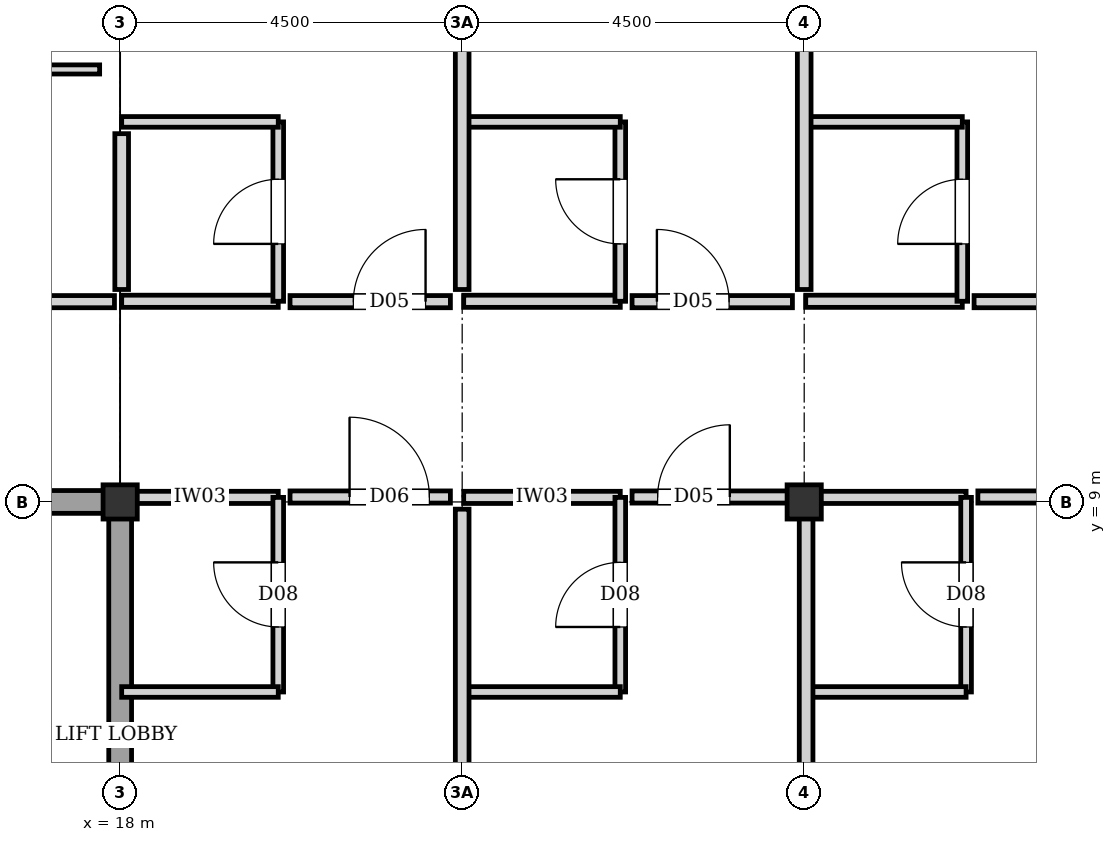
"""IFC4 building model, lengths in metres.
Left out: names, types, materials, properties, quantities, classifications, styles, units other than length and angle.
Written with IfcOpenShell. Run it as: python <this file> out.ifc"""

import sys

from ifc_helpers import new_model, si_unit, direction, frame, frame_2d, origin, origin_2d, place, context, subcontext, project, spatial, rectangle, extrude, element, fill, save


model = new_model("IFC4")
c1 = context("Model", 3, precision=1e-05, world=origin(), true_north=direction((0.0, 1.0)))
c2 = subcontext(c1, "Body", "Model", "MODEL_VIEW")
j1 = project(units=[si_unit("LENGTHUNIT", "METRE"), si_unit("PLANEANGLEUNIT", "RADIAN")], contexts=[c1])
p1 = place(None, origin())
s1 = spatial("IfcSite", under=j1, at=p1, CompositionType="ELEMENT")
p2 = place(p1, origin())
s2 = spatial("IfcBuilding", under=s1, at=p2, CompositionType="ELEMENT")
p3 = place(p2, frame((0.0, 0.0, 17.6)))
s3 = spatial("IfcBuildingStorey", under=s2, at=p3, CompositionType="ELEMENT", Elevation=17.6)
for number, where, z_axis, x_axis in (
    (1, (18.0, 9.0, 0.0), (0.0, 0.0, 1.0), (1.0, 0.0, 0.0)),
    (2, (27.0, 9.0, 0.0), (0.0, 0.0, 1.0), (1.0, 0.0, 0.0)),
):
    element("IfcColumn", number, at=place(p3, frame(where, z_axis=z_axis, x_axis=x_axis)), inside=s3, PredefinedType="COLUMN", context=c2, shape_type="SweptSolid", body=[
        extrude(rectangle(XDim=0.45, YDim=0.45, at=origin_2d()), origin(), (0.0, 0.0, 1.0), 3.04),
    ])
p4 = place(p3, frame((18.0, 0.0, 0.0), z_axis=(0.0, 0.0, 1.0), x_axis=(0.0, 1.0, 0.0)))
e3 = element("IfcWall", 3, at=p4, inside=s3, PredefinedType="SHEAR", context=c2, shape_type="SweptSolid", body=[
    extrude(rectangle(XDim=9.0, YDim=0.3, at=frame_2d((4.5, 0.0))), origin(), (0.0, 0.0, 1.0), 2.82),
])
p5 = place(p3, frame((9.0, 9.0, 0.0), z_axis=(0.0, 0.0, 1.0), x_axis=(1.0, 0.0, 0.0)))
e4 = element("IfcWall", 4, at=p5, inside=s3, PredefinedType="SHEAR", context=c2, shape_type="SweptSolid", body=[
    extrude(rectangle(XDim=9.0, YDim=0.3, at=frame_2d((4.5, 0.0))), origin(), (0.0, 0.0, 1.0), 2.82),
])
p6 = place(p5, frame((5.95, 0.0, 0.0)))
e5 = element("IfcOpeningElement", 5, at=p6, cuts=e4, PredefinedType="OPENING", context=c2, shape_type="SweptSolid", body=[
    extrude(rectangle(XDim=1.6, YDim=2.1, at=frame_2d((0.8, 1.05))), frame((0.0, 0.16, 0.0), z_axis=(0.0, -1.0, 0.0), x_axis=(1.0, 0.0, 0.0)), (0.0, 0.0, 1.0), 0.32),
])
p7 = place(p3, frame((18.02, 9.06, 0.0), z_axis=(0.0, 0.0, 1.0), x_axis=(1.0, 0.0, 0.0)))
e6 = element("IfcWall", 6, at=p7, inside=s3, PredefinedType="PARTITIONING", context=c2, shape_type="SweptSolid", body=[
    extrude(rectangle(XDim=2.06, YDim=0.16, at=frame_2d((1.03, 0.0))), origin(), (0.0, 0.0, 1.0), 2.34),
])
p8 = place(p3, frame((20.08, 6.5, 0.0), z_axis=(0.0, 0.0, 1.0), x_axis=(0.0, 1.0, 0.0)))
e7 = element("IfcWall", 7, at=p8, inside=s3, PredefinedType="PLUMBINGWALL", context=c2, shape_type="SweptSolid", body=[
    extrude(rectangle(XDim=2.56, YDim=0.14, at=frame_2d((1.28, 0.0))), origin(), (0.0, 0.0, 1.0), 2.82),
])
p9 = place(p8, frame((0.855, 0.0, 0.0)))
e8 = element("IfcOpeningElement", 8, at=p9, cuts=e7, PredefinedType="OPENING", context=c2, shape_type="SweptSolid", body=[
    extrude(rectangle(XDim=0.85, YDim=2.04, at=frame_2d((0.425, 1.02))), frame((0.0, 0.08, 0.0), z_axis=(0.0, -1.0, 0.0), x_axis=(1.0, 0.0, 0.0)), (0.0, 0.0, 1.0), 0.16),
])
p10 = place(p3, frame((18.02, 6.5, 0.0), z_axis=(0.0, 0.0, 1.0), x_axis=(1.0, 0.0, 0.0)))
e9 = element("IfcWall", 9, at=p10, inside=s3, PredefinedType="PLUMBINGWALL", context=c2, shape_type="SweptSolid", body=[
    extrude(rectangle(XDim=2.06, YDim=0.14, at=frame_2d((1.03, 0.0))), origin(), (0.0, 0.0, 1.0), 2.82),
])
p11 = place(p3, frame((22.52, 9.06, 0.0), z_axis=(0.0, 0.0, 1.0), x_axis=(1.0, 0.0, 0.0)))
e10 = element("IfcWall", 10, at=p11, inside=s3, PredefinedType="PARTITIONING", context=c2, shape_type="SweptSolid", body=[
    extrude(rectangle(XDim=2.06, YDim=0.16, at=frame_2d((1.03, 0.0))), origin(), (0.0, 0.0, 1.0), 2.34),
])
p12 = place(p3, frame((24.58, 6.5, 0.0), z_axis=(0.0, 0.0, 1.0), x_axis=(0.0, 1.0, 0.0)))
e11 = element("IfcWall", 11, at=p12, inside=s3, PredefinedType="PLUMBINGWALL", context=c2, shape_type="SweptSolid", body=[
    extrude(rectangle(XDim=2.56, YDim=0.14, at=frame_2d((1.28, 0.0))), origin(), (0.0, 0.0, 1.0), 2.82),
])
p13 = place(p12, frame((0.855, 0.0, 0.0)))
e12 = element("IfcOpeningElement", 12, at=p13, cuts=e11, PredefinedType="OPENING", context=c2, shape_type="SweptSolid", body=[
    extrude(rectangle(XDim=0.85, YDim=2.04, at=frame_2d((0.425, 1.02))), frame((0.0, 0.08, 0.0), z_axis=(0.0, -1.0, 0.0), x_axis=(1.0, 0.0, 0.0)), (0.0, 0.0, 1.0), 0.16),
])
p14 = place(p3, frame((22.52, 6.5, 0.0), z_axis=(0.0, 0.0, 1.0), x_axis=(1.0, 0.0, 0.0)))
e13 = element("IfcWall", 13, at=p14, inside=s3, PredefinedType="PLUMBINGWALL", context=c2, shape_type="SweptSolid", body=[
    extrude(rectangle(XDim=2.06, YDim=0.14, at=frame_2d((1.03, 0.0))), origin(), (0.0, 0.0, 1.0), 2.82),
])
p15 = place(p3, frame((27.07, 9.06, 0.0), z_axis=(0.0, 0.0, 1.0), x_axis=(1.0, 0.0, 0.0)))
e14 = element("IfcWall", 14, at=p15, inside=s3, PredefinedType="PARTITIONING", context=c2, shape_type="SweptSolid", body=[
    extrude(rectangle(XDim=2.06, YDim=0.16, at=frame_2d((1.03, 0.0))), origin(), (0.0, 0.0, 1.0), 2.29),
])
p16 = place(p3, frame((29.13, 6.5, 0.0), z_axis=(0.0, 0.0, 1.0), x_axis=(0.0, 1.0, 0.0)))
e15 = element("IfcWall", 15, at=p16, inside=s3, PredefinedType="PLUMBINGWALL", context=c2, shape_type="SweptSolid", body=[
    extrude(rectangle(XDim=2.56, YDim=0.14, at=frame_2d((1.28, 0.0))), origin(), (0.0, 0.0, 1.0), 2.82),
])
p17 = place(p16, frame((0.855, 0.0, 0.0)))
e16 = element("IfcOpeningElement", 16, at=p17, cuts=e15, PredefinedType="OPENING", context=c2, shape_type="SweptSolid", body=[
    extrude(rectangle(XDim=0.85, YDim=2.04, at=frame_2d((0.425, 1.02))), frame((0.0, 0.08, 0.0), z_axis=(0.0, -1.0, 0.0), x_axis=(1.0, 0.0, 0.0)), (0.0, 0.0, 1.0), 0.16),
])
p18 = place(p3, frame((27.07, 6.5, 0.0), z_axis=(0.0, 0.0, 1.0), x_axis=(1.0, 0.0, 0.0)))
e17 = element("IfcWall", 17, at=p18, inside=s3, PredefinedType="PLUMBINGWALL", context=c2, shape_type="SweptSolid", body=[
    extrude(rectangle(XDim=2.06, YDim=0.14, at=frame_2d((1.03, 0.0))), origin(), (0.0, 0.0, 1.0), 2.82),
])
p19 = place(p3, frame((18.02, 11.64, 0.0), z_axis=(0.0, 0.0, 1.0), x_axis=(1.0, 0.0, 0.0)))
e18 = element("IfcWall", 18, at=p19, inside=s3, PredefinedType="PARTITIONING", context=c2, shape_type="SweptSolid", body=[
    extrude(rectangle(XDim=2.06, YDim=0.16, at=frame_2d((1.03, 0.0))), origin(), (0.0, 0.0, 1.0), 2.82),
])
p20 = place(p3, frame((20.08, 11.64, 0.0), z_axis=(0.0, 0.0, 1.0), x_axis=(0.0, 1.0, 0.0)))
e19 = element("IfcWall", 19, at=p20, inside=s3, PredefinedType="PLUMBINGWALL", context=c2, shape_type="SweptSolid", body=[
    extrude(rectangle(XDim=2.36, YDim=0.14, at=frame_2d((1.18, 0.0))), origin(), (0.0, 0.0, 1.0), 2.82),
])
p21 = place(p20, frame((0.755, 0.0, 0.0)))
e20 = element("IfcOpeningElement", 20, at=p21, cuts=e19, PredefinedType="OPENING", context=c2, shape_type="SweptSolid", body=[
    extrude(rectangle(XDim=0.85, YDim=2.04, at=frame_2d((0.425, 1.02))), frame((0.0, 0.08, 0.0), z_axis=(0.0, -1.0, 0.0), x_axis=(1.0, 0.0, 0.0)), (0.0, 0.0, 1.0), 0.16),
])
p22 = place(p3, frame((18.02, 14.0, 0.0), z_axis=(0.0, 0.0, 1.0), x_axis=(1.0, 0.0, 0.0)))
e21 = element("IfcWall", 21, at=p22, inside=s3, PredefinedType="PLUMBINGWALL", context=c2, shape_type="SweptSolid", body=[
    extrude(rectangle(XDim=2.06, YDim=0.14, at=frame_2d((1.03, 0.0))), origin(), (0.0, 0.0, 1.0), 2.82),
])
p23 = place(p3, frame((22.52, 11.64, 0.0), z_axis=(0.0, 0.0, 1.0), x_axis=(1.0, 0.0, 0.0)))
e22 = element("IfcWall", 22, at=p23, inside=s3, PredefinedType="PARTITIONING", context=c2, shape_type="SweptSolid", body=[
    extrude(rectangle(XDim=2.06, YDim=0.16, at=frame_2d((1.03, 0.0))), origin(), (0.0, 0.0, 1.0), 2.82),
])
p24 = place(p3, frame((24.58, 11.64, 0.0), z_axis=(0.0, 0.0, 1.0), x_axis=(0.0, 1.0, 0.0)))
e23 = element("IfcWall", 23, at=p24, inside=s3, PredefinedType="PLUMBINGWALL", context=c2, shape_type="SweptSolid", body=[
    extrude(rectangle(XDim=2.36, YDim=0.14, at=frame_2d((1.18, 0.0))), origin(), (0.0, 0.0, 1.0), 2.82),
])
p25 = place(p24, frame((0.755, 0.0, 0.0)))
e24 = element("IfcOpeningElement", 24, at=p25, cuts=e23, PredefinedType="OPENING", context=c2, shape_type="SweptSolid", body=[
    extrude(rectangle(XDim=0.85, YDim=2.04, at=frame_2d((0.425, 1.02))), frame((0.0, 0.08, 0.0), z_axis=(0.0, -1.0, 0.0), x_axis=(1.0, 0.0, 0.0)), (0.0, 0.0, 1.0), 0.16),
])
p26 = place(p3, frame((22.52, 14.0, 0.0), z_axis=(0.0, 0.0, 1.0), x_axis=(1.0, 0.0, 0.0)))
e25 = element("IfcWall", 25, at=p26, inside=s3, PredefinedType="PLUMBINGWALL", context=c2, shape_type="SweptSolid", body=[
    extrude(rectangle(XDim=2.06, YDim=0.14, at=frame_2d((1.03, 0.0))), origin(), (0.0, 0.0, 1.0), 2.82),
])
p27 = place(p3, frame((27.02, 11.64, 0.0), z_axis=(0.0, 0.0, 1.0), x_axis=(1.0, 0.0, 0.0)))
e26 = element("IfcWall", 26, at=p27, inside=s3, PredefinedType="PARTITIONING", context=c2, shape_type="SweptSolid", body=[
    extrude(rectangle(XDim=2.06, YDim=0.16, at=frame_2d((1.03, 0.0))), origin(), (0.0, 0.0, 1.0), 2.82),
])
p28 = place(p3, frame((29.08, 11.64, 0.0), z_axis=(0.0, 0.0, 1.0), x_axis=(0.0, 1.0, 0.0)))
e27 = element("IfcWall", 27, at=p28, inside=s3, PredefinedType="PLUMBINGWALL", context=c2, shape_type="SweptSolid", body=[
    extrude(rectangle(XDim=2.36, YDim=0.14, at=frame_2d((1.18, 0.0))), origin(), (0.0, 0.0, 1.0), 2.82),
])
p29 = place(p28, frame((0.755, 0.0, 0.0)))
e28 = element("IfcOpeningElement", 28, at=p29, cuts=e27, PredefinedType="OPENING", context=c2, shape_type="SweptSolid", body=[
    extrude(rectangle(XDim=0.85, YDim=2.04, at=frame_2d((0.425, 1.02))), frame((0.0, 0.08, 0.0), z_axis=(0.0, -1.0, 0.0), x_axis=(1.0, 0.0, 0.0)), (0.0, 0.0, 1.0), 0.16),
])
p30 = place(p3, frame((27.02, 14.0, 0.0), z_axis=(0.0, 0.0, 1.0), x_axis=(1.0, 0.0, 0.0)))
e29 = element("IfcWall", 29, at=p30, inside=s3, PredefinedType="PLUMBINGWALL", context=c2, shape_type="SweptSolid", body=[
    extrude(rectangle(XDim=2.06, YDim=0.14, at=frame_2d((1.03, 0.0))), origin(), (0.0, 0.0, 1.0), 2.82),
])
p31 = place(p3, frame((22.5, 0.195, 0.0), z_axis=(0.0, 0.0, 1.0), x_axis=(0.0, 1.0, 0.0)))
e30 = element("IfcWall", 30, at=p31, inside=s3, PredefinedType="PARTITIONING", context=c2, shape_type="SweptSolid", body=[
    extrude(rectangle(XDim=8.71, YDim=0.18, at=frame_2d((4.355, 0.0))), origin(), (0.0, 0.0, 1.0), 2.82),
])
p32 = place(p3, frame((27.025, 0.195, 0.0), z_axis=(0.0, 0.0, 1.0), x_axis=(0.0, 1.0, 0.0)))
e31 = element("IfcWall", 31, at=p32, inside=s3, PredefinedType="PARTITIONING", context=c2, shape_type="SweptSolid", body=[
    extrude(rectangle(XDim=8.71, YDim=0.18, at=frame_2d((4.355, 0.0))), origin(), (0.0, 0.0, 1.0), 2.34),
])
p33 = place(p3, frame((22.5, 11.795, 0.0), z_axis=(0.0, 0.0, 1.0), x_axis=(0.0, 1.0, 0.0)))
e32 = element("IfcWall", 32, at=p33, inside=s3, PredefinedType="PARTITIONING", context=c2, shape_type="SweptSolid", body=[
    extrude(rectangle(XDim=6.03, YDim=0.18, at=frame_2d((3.015, 0.0))), origin(), (0.0, 0.0, 1.0), 2.82),
])
p34 = place(p3, frame((27.0, 11.795, 0.0), z_axis=(0.0, 0.0, 1.0), x_axis=(0.0, 1.0, 0.0)))
e33 = element("IfcWall", 33, at=p34, inside=s3, PredefinedType="PARTITIONING", context=c2, shape_type="SweptSolid", body=[
    extrude(rectangle(XDim=6.03, YDim=0.18, at=frame_2d((3.015, 0.0))), origin(), (0.0, 0.0, 1.0), 2.29),
])
p35 = place(p3, frame((18.02, 11.795, 0.0), z_axis=(0.0, 0.0, 1.0), x_axis=(0.0, 1.0, 0.0)))
e34 = element("IfcWall", 34, at=p35, inside=s3, PredefinedType="PARTITIONING", context=c2, shape_type="SweptSolid", body=[
    extrude(rectangle(XDim=2.05, YDim=0.18, at=frame_2d((1.025, 0.0))), origin(), (0.0, 0.0, 1.0), 2.48),
])
p36 = place(p3, frame((15.09, 14.69, 0.0), z_axis=(0.0, 0.0, 1.0), x_axis=(1.0, 0.0, 0.0)))
e35 = element("IfcWall", 35, at=p36, inside=s3, PredefinedType="PARTITIONING", context=c2, shape_type="SweptSolid", body=[
    extrude(rectangle(XDim=2.64, YDim=0.12, at=frame_2d((1.32, 0.0))), origin(), (0.0, 0.0, 1.0), 2.82),
])
p37 = place(p3, frame((20.235, 9.065, 0.0), z_axis=(0.0, 0.0, 1.0), x_axis=(1.0, 0.0, 0.0)))
e36 = element("IfcWall", 36, at=p37, inside=s3, PredefinedType="PARTITIONING", context=c2, shape_type="SweptSolid", body=[
    extrude(rectangle(XDim=2.11, YDim=0.16, at=frame_2d((1.055, 0.0))), origin(), (0.0, 0.0, 1.0), 2.34),
])
p38 = place(p37, frame((0.783, 0.0, 0.0)))
e37 = element("IfcOpeningElement", 37, at=p38, cuts=e36, PredefinedType="OPENING", context=c2, shape_type="SweptSolid", body=[
    extrude(rectangle(XDim=1.05, YDim=2.15, at=frame_2d((0.525, 1.075))), frame((0.0, 0.09, 0.0), z_axis=(0.0, -1.0, 0.0), x_axis=(1.0, 0.0, 0.0)), (0.0, 0.0, 1.0), 0.18),
])
p39 = place(p3, frame((24.735, 9.065, 0.0), z_axis=(0.0, 0.0, 1.0), x_axis=(1.0, 0.0, 0.0)))
e38 = element("IfcWall", 38, at=p39, inside=s3, PredefinedType="PARTITIONING", context=c2, shape_type="SweptSolid", body=[
    extrude(rectangle(XDim=2.135, YDim=0.16, at=frame_2d((1.067, 0.0))), origin(), (0.0, 0.0, 1.0), 2.34),
])
p40 = place(p39, frame((0.336, 0.0, 0.0)))
e39 = element("IfcOpeningElement", 39, at=p40, cuts=e38, PredefinedType="OPENING", context=c2, shape_type="SweptSolid", body=[
    extrude(rectangle(XDim=0.95, YDim=2.15, at=frame_2d((0.475, 1.075))), frame((0.0, 0.09, 0.0), z_axis=(0.0, -1.0, 0.0), x_axis=(1.0, 0.0, 0.0)), (0.0, 0.0, 1.0), 0.18),
])
p41 = place(p3, frame((29.285, 9.065, 0.0), z_axis=(0.0, 0.0, 1.0), x_axis=(1.0, 0.0, 0.0)))
e40 = element("IfcWall", 40, at=p41, inside=s3, PredefinedType="PARTITIONING", context=c2, shape_type="SweptSolid", body=[
    extrude(rectangle(XDim=6.56, YDim=0.16, at=frame_2d((3.28, 0.0))), origin(), (0.0, 0.0, 1.0), 2.29),
])
p42 = place(p41, frame((1.75, 0.0, 0.0)))
e41 = element("IfcOpeningElement", 41, at=p42, cuts=e40, PredefinedType="OPENING", context=c2, shape_type="SweptSolid", body=[
    extrude(rectangle(XDim=1.3, YDim=2.25, at=frame_2d((0.65, 1.125))), frame((0.0, 0.09, 0.0), z_axis=(0.0, -1.0, 0.0), x_axis=(1.0, 0.0, 0.0)), (0.0, 0.0, 1.0), 0.18),
])
p43 = place(p3, frame((15.09, 11.635, 0.0), z_axis=(0.0, 0.0, 1.0), x_axis=(1.0, 0.0, 0.0)))
e42 = element("IfcWall", 42, at=p43, inside=s3, PredefinedType="PARTITIONING", context=c2, shape_type="SweptSolid", body=[
    extrude(rectangle(XDim=2.835, YDim=0.16, at=frame_2d((1.417, 0.0))), origin(), (0.0, 0.0, 1.0), 2.82),
])
p44 = place(p43, frame((0.577, 0.0, 0.0)))
e43 = element("IfcOpeningElement", 43, at=p44, cuts=e42, PredefinedType="OPENING", context=c2, shape_type="SweptSolid", body=[
    extrude(rectangle(XDim=1.0, YDim=2.1, at=frame_2d((0.5, 1.05))), frame((0.0, 0.09, 0.0), z_axis=(0.0, -1.0, 0.0), x_axis=(1.0, 0.0, 0.0)), (0.0, 0.0, 1.0), 0.18),
])
p45 = place(p3, frame((20.235, 11.635, 0.0), z_axis=(0.0, 0.0, 1.0), x_axis=(1.0, 0.0, 0.0)))
e44 = element("IfcWall", 44, at=p45, inside=s3, PredefinedType="PARTITIONING", context=c2, shape_type="SweptSolid", body=[
    extrude(rectangle(XDim=2.11, YDim=0.16, at=frame_2d((1.055, 0.0))), origin(), (0.0, 0.0, 1.0), 2.82),
])
p46 = place(p45, frame((0.833, 0.0, 0.0)))
e45 = element("IfcOpeningElement", 45, at=p46, cuts=e44, PredefinedType="OPENING", context=c2, shape_type="SweptSolid", body=[
    extrude(rectangle(XDim=0.95, YDim=2.15, at=frame_2d((0.475, 1.075))), frame((0.0, 0.09, 0.0), z_axis=(0.0, -1.0, 0.0), x_axis=(1.0, 0.0, 0.0)), (0.0, 0.0, 1.0), 0.18),
])
p47 = place(p3, frame((24.735, 11.635, 0.0), z_axis=(0.0, 0.0, 1.0), x_axis=(1.0, 0.0, 0.0)))
e46 = element("IfcWall", 46, at=p47, inside=s3, PredefinedType="PARTITIONING", context=c2, shape_type="SweptSolid", body=[
    extrude(rectangle(XDim=2.11, YDim=0.16, at=frame_2d((1.055, 0.0))), origin(), (0.0, 0.0, 1.0), 2.82),
])
p48 = place(p47, frame((0.327, 0.0, 0.0)))
e47 = element("IfcOpeningElement", 47, at=p48, cuts=e46, PredefinedType="OPENING", context=c2, shape_type="SweptSolid", body=[
    extrude(rectangle(XDim=0.95, YDim=2.15, at=frame_2d((0.475, 1.075))), frame((0.0, 0.09, 0.0), z_axis=(0.0, -1.0, 0.0), x_axis=(1.0, 0.0, 0.0)), (0.0, 0.0, 1.0), 0.18),
])
p49 = place(p3, frame((29.235, 11.635, 0.0), z_axis=(0.0, 0.0, 1.0), x_axis=(1.0, 0.0, 0.0)))
e48 = element("IfcWall", 48, at=p49, inside=s3, PredefinedType="PARTITIONING", context=c2, shape_type="SweptSolid", body=[
    extrude(rectangle(XDim=2.11, YDim=0.16, at=frame_2d((1.055, 0.0))), origin(), (0.0, 0.0, 1.0), 2.82),
])
p50 = place(p49, frame((0.833, 0.0, 0.0)))
e49 = element("IfcOpeningElement", 49, at=p50, cuts=e48, PredefinedType="OPENING", context=c2, shape_type="SweptSolid", body=[
    extrude(rectangle(XDim=0.95, YDim=2.15, at=frame_2d((0.475, 1.075))), frame((0.0, 0.09, 0.0), z_axis=(0.0, -1.0, 0.0), x_axis=(1.0, 0.0, 0.0)), (0.0, 0.0, 1.0), 0.18),
])
p51 = place(p9, origin())
e50 = element("IfcDoor", 50, at=p51, inside=s3, OperationType="SINGLE_SWING_RIGHT", PredefinedType="DOOR", context=c2, shape_type="SweptSolid", body=[
    extrude(rectangle(XDim=0.85, YDim=2.04, at=frame_2d((0.425, 1.02))), frame((0.0, 0.025, 0.0), z_axis=(0.0, -1.0, 0.0), x_axis=(1.0, 0.0, 0.0)), (0.0, 0.0, 1.0), 0.05),
])
fill(e8, e50)
p52 = place(p13, origin())
e51 = element("IfcDoor", 51, at=p52, inside=s3, OperationType="SINGLE_SWING_LEFT", PredefinedType="DOOR", context=c2, shape_type="SweptSolid", body=[
    extrude(rectangle(XDim=0.85, YDim=2.04, at=frame_2d((0.425, 1.02))), frame((0.0, 0.025, 0.0), z_axis=(0.0, -1.0, 0.0), x_axis=(1.0, 0.0, 0.0)), (0.0, 0.0, 1.0), 0.05),
])
fill(e12, e51)
p53 = place(p17, origin())
e52 = element("IfcDoor", 52, at=p53, inside=s3, OperationType="SINGLE_SWING_RIGHT", PredefinedType="DOOR", context=c2, shape_type="SweptSolid", body=[
    extrude(rectangle(XDim=0.85, YDim=2.04, at=frame_2d((0.425, 1.02))), frame((0.0, 0.025, 0.0), z_axis=(0.0, -1.0, 0.0), x_axis=(1.0, 0.0, 0.0)), (0.0, 0.0, 1.0), 0.05),
])
fill(e16, e52)
p54 = place(p21, origin())
e53 = element("IfcDoor", 53, at=p54, inside=s3, OperationType="SINGLE_SWING_LEFT", PredefinedType="DOOR", context=c2, shape_type="SweptSolid", body=[
    extrude(rectangle(XDim=0.85, YDim=2.04, at=frame_2d((0.425, 1.02))), frame((0.0, 0.025, 0.0), z_axis=(0.0, -1.0, 0.0), x_axis=(1.0, 0.0, 0.0)), (0.0, 0.0, 1.0), 0.05),
])
fill(e20, e53)
p55 = place(p25, origin())
e54 = element("IfcDoor", 54, at=p55, inside=s3, OperationType="SINGLE_SWING_RIGHT", PredefinedType="DOOR", context=c2, shape_type="SweptSolid", body=[
    extrude(rectangle(XDim=0.85, YDim=2.04, at=frame_2d((0.425, 1.02))), frame((0.0, 0.025, 0.0), z_axis=(0.0, -1.0, 0.0), x_axis=(1.0, 0.0, 0.0)), (0.0, 0.0, 1.0), 0.05),
])
fill(e24, e54)
p56 = place(p29, origin())
e55 = element("IfcDoor", 55, at=p56, inside=s3, OperationType="SINGLE_SWING_LEFT", PredefinedType="DOOR", context=c2, shape_type="SweptSolid", body=[
    extrude(rectangle(XDim=0.85, YDim=2.04, at=frame_2d((0.425, 1.02))), frame((0.0, 0.025, 0.0), z_axis=(0.0, -1.0, 0.0), x_axis=(1.0, 0.0, 0.0)), (0.0, 0.0, 1.0), 0.05),
])
fill(e28, e55)
p57 = place(p38, origin())
e56 = element("IfcDoor", 56, at=p57, inside=s3, OperationType="SINGLE_SWING_LEFT", PredefinedType="DOOR", context=c2, shape_type="SweptSolid", body=[
    extrude(rectangle(XDim=1.05, YDim=2.15, at=frame_2d((0.525, 1.075))), frame((0.0, 0.025, 0.0), z_axis=(0.0, -1.0, 0.0), x_axis=(1.0, 0.0, 0.0)), (0.0, 0.0, 1.0), 0.05),
])
fill(e37, e56)
p58 = place(p40, origin())
e57 = element("IfcDoor", 57, at=p58, inside=s3, OperationType="SINGLE_SWING_RIGHT", PredefinedType="DOOR", context=c2, shape_type="SweptSolid", body=[
    extrude(rectangle(XDim=0.95, YDim=2.15, at=frame_2d((0.475, 1.075))), frame((0.0, 0.025, 0.0), z_axis=(0.0, -1.0, 0.0), x_axis=(1.0, 0.0, 0.0)), (0.0, 0.0, 1.0), 0.05),
])
fill(e39, e57)
p59 = place(p46, origin())
e58 = element("IfcDoor", 58, at=p59, inside=s3, OperationType="SINGLE_SWING_RIGHT", PredefinedType="DOOR", context=c2, shape_type="SweptSolid", body=[
    extrude(rectangle(XDim=0.95, YDim=2.15, at=frame_2d((0.475, 1.075))), frame((0.0, 0.025, 0.0), z_axis=(0.0, -1.0, 0.0), x_axis=(1.0, 0.0, 0.0)), (0.0, 0.0, 1.0), 0.05),
])
fill(e45, e58)
p60 = place(p48, origin())
e59 = element("IfcDoor", 59, at=p60, inside=s3, OperationType="SINGLE_SWING_LEFT", PredefinedType="DOOR", context=c2, shape_type="SweptSolid", body=[
    extrude(rectangle(XDim=0.95, YDim=2.15, at=frame_2d((0.475, 1.075))), frame((0.0, 0.025, 0.0), z_axis=(0.0, -1.0, 0.0), x_axis=(1.0, 0.0, 0.0)), (0.0, 0.0, 1.0), 0.05),
])
fill(e47, e59)
save(model, sys.argv[1])
